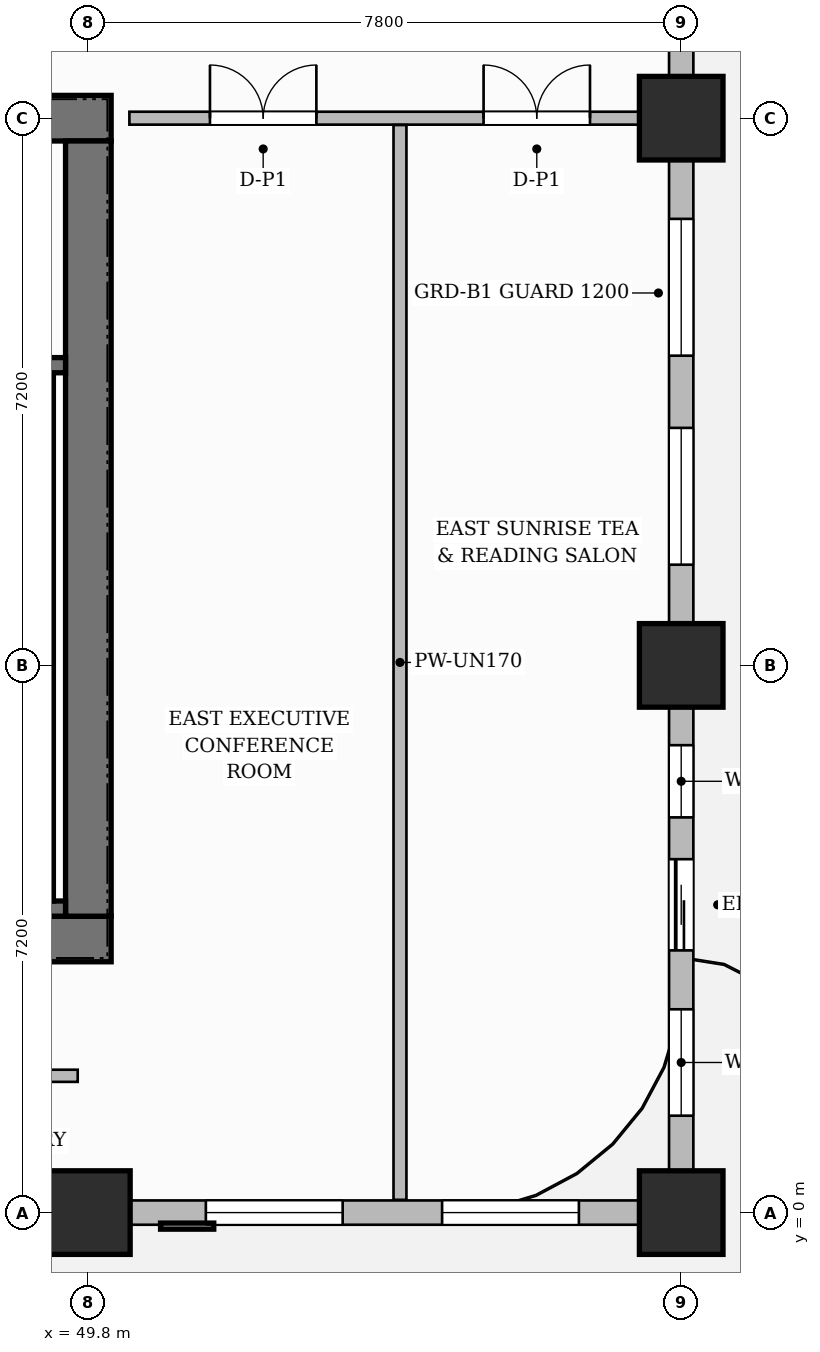
"""IFC4 building model, lengths in metres.
Left out: names, types, materials, properties, quantities, classifications, styles, units other than length and angle.
Written with IfcOpenShell. Run it as: python <this file> out.ifc"""

import sys

from ifc_helpers import new_model, si_unit, direction, frame, frame_2d, origin, origin_2d, place, context, subcontext, project, spatial, rectangle, extrude, source, transform, mapped, element, fill, save


model = new_model("IFC4")
c1 = context("Model", 3, precision=1e-05, world=origin(), true_north=direction((0.0, 1.0)))
c2 = subcontext(c1, "Body", "Model", "MODEL_VIEW")
j1 = project(units=[si_unit("LENGTHUNIT", "METRE"), si_unit("PLANEANGLEUNIT", "RADIAN")], contexts=[c1])
p1 = place(None, origin())
s1 = spatial("IfcSite", under=j1, at=p1, CompositionType="ELEMENT")
p2 = place(p1, origin())
s2 = spatial("IfcBuilding", under=s1, at=p2, CompositionType="ELEMENT")
p3 = place(p2, frame((0.0, 0.0, 39.8)))
s3 = spatial("IfcBuildingStorey", under=s2, at=p3, CompositionType="ELEMENT", Elevation=39.8)
p4 = place(p3, frame((34.5, 3.6, 0.0), z_axis=(0.0, 0.0, 1.0), x_axis=(1.0, 0.0, 0.0)))
e1 = element("IfcWall", 1, at=p4, inside=s3, PredefinedType="SHEAR", context=c2, shape_type="SweptSolid", body=[
    extrude(rectangle(XDim=15.6, YDim=0.6, at=frame_2d((7.8, 0.0))), origin(), (0.0, 0.0, 1.0), 3.7),
])
p5 = place(p4, frame((4.77, 0.0, 0.0)))
e2 = element("IfcOpeningElement", 2, at=p5, cuts=e1, PredefinedType="OPENING", context=c2, shape_type="SweptSolid", body=[
    extrude(rectangle(XDim=0.9, YDim=2.1, at=frame_2d((0.45, 1.05))), frame((0.0, 0.31, 0.0), z_axis=(0.0, -1.0, 0.0), x_axis=(1.0, 0.0, 0.0)), (0.0, 0.0, 1.0), 0.62),
])
p6 = place(p4, frame((7.15, 0.0, 0.0)))
e3 = element("IfcOpeningElement", 3, at=p6, cuts=e1, PredefinedType="OPENING", context=c2, shape_type="SweptSolid", body=[
    extrude(rectangle(XDim=0.9, YDim=2.1, at=frame_2d((0.45, 1.05))), frame((0.0, 0.31, 0.0), z_axis=(0.0, -1.0, 0.0), x_axis=(1.0, 0.0, 0.0)), (0.0, 0.0, 1.0), 0.62),
])
p7 = place(p3, frame((34.5, 14.4, 0.0), z_axis=(0.0, 0.0, 1.0), x_axis=(1.0, 0.0, 0.0)))
e4 = element("IfcWall", 4, at=p7, inside=s3, PredefinedType="SHEAR", context=c2, shape_type="SweptSolid", body=[
    extrude(rectangle(XDim=15.6, YDim=0.6, at=frame_2d((7.8, 0.0))), origin(), (0.0, 0.0, 1.0), 3.7),
])
p8 = place(p7, frame((5.43, 0.0, 0.0)))
e5 = element("IfcOpeningElement", 5, at=p8, cuts=e4, PredefinedType="OPENING", context=c2, shape_type="SweptSolid", body=[
    extrude(rectangle(XDim=1.5, YDim=2.2, at=frame_2d((0.75, 1.1))), frame((0.0, 0.31, 0.0), z_axis=(0.0, -1.0, 0.0), x_axis=(1.0, 0.0, 0.0)), (0.0, 0.0, 1.0), 0.62),
])
p9 = place(p7, frame((1.645, 0.0, 0.0)))
e6 = element("IfcOpeningElement", 6, at=p9, cuts=e4, PredefinedType="OPENING", context=c2, shape_type="SweptSolid", body=[
    extrude(rectangle(XDim=1.05, YDim=2.15, at=frame_2d((0.525, 1.075))), frame((0.0, 0.31, 0.0), z_axis=(0.0, -1.0, 0.0), x_axis=(1.0, 0.0, 0.0)), (0.0, 0.0, 1.0), 0.62),
])
p10 = place(p7, frame((11.275, 0.0, 0.0)))
e7 = element("IfcOpeningElement", 7, at=p10, cuts=e4, PredefinedType="OPENING", context=c2, shape_type="SweptSolid", body=[
    extrude(rectangle(XDim=1.05, YDim=2.15, at=frame_2d((0.525, 1.075))), frame((0.0, 0.31, 0.0), z_axis=(0.0, -1.0, 0.0), x_axis=(1.0, 0.0, 0.0)), (0.0, 0.0, 1.0), 0.62),
])
p11 = place(p3, frame((49.8, 3.9, 0.0), z_axis=(0.0, 0.0, 1.0), x_axis=(0.0, 1.0, 0.0)))
e8 = element("IfcWall", 8, at=p11, inside=s3, PredefinedType="SHEAR", context=c2, shape_type="SweptSolid", body=[
    extrude(rectangle(XDim=10.2, YDim=0.6, at=frame_2d((5.1, 0.0))), origin(), (0.0, 0.0, 1.0), 3.7),
])
m1 = source(origin(), c2, "Body", "SweptSolid", [
    extrude(rectangle(XDim=1.1, YDim=1.1, at=origin_2d()), origin(), (0.0, 0.0, 1.0), 3.7),
])
for number, where, z_axis, x_axis in (
    (9, (49.8, 0.0, 0.0), (0.0, 0.0, 1.0), (1.0, 0.0, 0.0)),
    (10, (57.6, 0.0, 0.0), (0.0, 0.0, 1.0), (1.0, 0.0, 0.0)),
    (11, (57.6, 7.2, 0.0), (0.0, 0.0, 1.0), (1.0, 0.0, 0.0)),
    (12, (57.6, 14.4, 0.0), (0.0, 0.0, 1.0), (1.0, 0.0, 0.0)),
):
    element("IfcColumn", number, at=place(p3, frame(where, z_axis=z_axis, x_axis=x_axis)), inside=s3, PredefinedType="COLUMN", context=c2, shape_type="MappedRepresentation", body=[
        mapped(m1, transform((0.0, 0.0, 0.0), scale=1.0)),
    ])
p12 = place(p3, frame((43.12, 4.0, 0.0), z_axis=(0.0, 0.0, 1.0), x_axis=(1.0, 0.0, 0.0)))
e13 = element("IfcWall", 13, at=p12, inside=s3, PredefinedType="SHEAR", context=c2, shape_type="SweptSolid", body=[
    extrude(rectangle(XDim=6.38, YDim=0.2, at=frame_2d((3.19, 0.0))), origin(), (0.0, 0.0, 1.0), 3.7),
])
p13 = place(p3, frame((49.24, 4.1, 0.0), z_axis=(0.0, 0.0, 1.0), x_axis=(0.0, 1.0, 0.0)))
e14 = element("IfcWall", 14, at=p13, inside=s3, PredefinedType="SHEAR", context=c2, shape_type="SweptSolid", body=[
    extrude(rectangle(XDim=6.95, YDim=0.2, at=frame_2d((3.475, 0.0))), origin(), (0.0, 0.0, 1.0), 3.7),
])
p14 = place(p3, frame((43.12, 11.15, 0.0), z_axis=(0.0, 0.0, 1.0), x_axis=(1.0, 0.0, 0.0)))
e15 = element("IfcWall", 15, at=p14, inside=s3, PredefinedType="SHEAR", context=c2, shape_type="SweptSolid", body=[
    extrude(rectangle(XDim=6.38, YDim=0.2, at=frame_2d((3.19, 0.0))), origin(), (0.0, 0.0, 1.0), 3.7),
])
p15 = place(p14, frame((1.045, 0.0, 0.0)))
e16 = element("IfcOpeningElement", 16, at=p15, cuts=e15, PredefinedType="OPENING", context=c2, shape_type="SweptSolid", body=[
    extrude(rectangle(XDim=1.05, YDim=2.2, at=frame_2d((0.525, 1.1))), frame((0.0, 0.11, 0.0), z_axis=(0.0, -1.0, 0.0), x_axis=(1.0, 0.0, 0.0)), (0.0, 0.0, 1.0), 0.22),
])
p16 = place(p14, frame((4.125, 0.0, 0.0)))
e17 = element("IfcOpeningElement", 17, at=p16, cuts=e15, PredefinedType="OPENING", context=c2, shape_type="SweptSolid", body=[
    extrude(rectangle(XDim=1.05, YDim=2.2, at=frame_2d((0.525, 1.1))), frame((0.0, 0.11, 0.0), z_axis=(0.0, -1.0, 0.0), x_axis=(1.0, 0.0, 0.0)), (0.0, 0.0, 1.0), 0.22),
])
p17 = place(p3, frame((30.29, 1.8, 0.0), z_axis=(0.0, 0.0, 1.0), x_axis=(1.0, 0.0, 0.0)))
e18 = element("IfcWall", 18, at=p17, inside=s3, PredefinedType="PARTITIONING", context=c2, shape_type="SweptSolid", body=[
    extrude(rectangle(XDim=19.37, YDim=0.16, at=frame_2d((9.685, 0.0))), origin(), (0.0, 0.0, 1.0), 3.45),
])
p18 = place(p17, frame((5.213, 0.0, 0.0)))
e19 = element("IfcOpeningElement", 19, at=p18, cuts=e18, PredefinedType="OPENING", context=c2, shape_type="SweptSolid", body=[
    extrude(rectangle(XDim=0.9, YDim=2.15, at=frame_2d((0.45, 1.075))), frame((0.0, 0.09, 0.0), z_axis=(0.0, -1.0, 0.0), x_axis=(1.0, 0.0, 0.0)), (0.0, 0.0, 1.0), 0.18),
])
p19 = place(p17, frame((14.06, 0.0, 0.0)))
e20 = element("IfcOpeningElement", 20, at=p19, cuts=e18, PredefinedType="OPENING", context=c2, shape_type="SweptSolid", body=[
    extrude(rectangle(XDim=0.9, YDim=2.15, at=frame_2d((0.45, 1.075))), frame((0.0, 0.09, 0.0), z_axis=(0.0, -1.0, 0.0), x_axis=(1.0, 0.0, 0.0)), (0.0, 0.0, 1.0), 0.18),
])
p20 = place(p3, frame((50.34, 14.4, 0.0), z_axis=(0.0, 0.0, 1.0), x_axis=(1.0, 0.0, 0.0)))
e21 = element("IfcWall", 21, at=p20, inside=s3, PredefinedType="PARTITIONING", context=c2, shape_type="SweptSolid", body=[
    extrude(rectangle(XDim=7.07, YDim=0.17, at=frame_2d((3.535, 0.0))), origin(), (0.0, 0.0, 1.0), 2.885),
])
p21 = place(p20, frame((1.06, 0.0, 0.0)))
e22 = element("IfcOpeningElement", 22, at=p21, cuts=e21, PredefinedType="OPENING", context=c2, shape_type="SweptSolid", body=[
    extrude(rectangle(XDim=1.4, YDim=2.35, at=frame_2d((0.7, 1.175))), frame((0.0, 0.095, 0.0), z_axis=(0.0, -1.0, 0.0), x_axis=(1.0, 0.0, 0.0)), (0.0, 0.0, 1.0), 0.19),
])
p22 = place(p20, frame((4.66, 0.0, 0.0)))
e23 = element("IfcOpeningElement", 23, at=p22, cuts=e21, PredefinedType="OPENING", context=c2, shape_type="SweptSolid", body=[
    extrude(rectangle(XDim=1.4, YDim=2.35, at=frame_2d((0.7, 1.175))), frame((0.0, 0.095, 0.0), z_axis=(0.0, -1.0, 0.0), x_axis=(1.0, 0.0, 0.0)), (0.0, 0.0, 1.0), 0.19),
])
p23 = place(p3, frame((53.9, 0.168, 0.0), z_axis=(0.0, 0.0, 1.0), x_axis=(0.0, 1.0, 0.0)))
e24 = element("IfcWall", 24, at=p23, inside=s3, PredefinedType="PARTITIONING", context=c2, shape_type="SweptSolid", body=[
    extrude(rectangle(XDim=14.142, YDim=0.17, at=frame_2d((7.071, 0.0))), origin(), (0.0, 0.0, 1.0), 3.035),
])
p24 = place(p3, frame((14.4, 0.0, 0.0), z_axis=(0.0, 0.0, 1.0), x_axis=(1.0, 0.0, 0.0)))
e25 = element("IfcWall", 25, at=p24, inside=s3, PredefinedType="SOLIDWALL", context=c2, shape_type="SweptSolid", body=[
    extrude(rectangle(XDim=43.2, YDim=0.32, at=frame_2d((21.6, 0.0))), origin(), (0.0, 0.0, 1.0), 2.885),
])
p25 = place(p24, frame((1.5, 0.0, 0.0)))
e26 = element("IfcOpeningElement", 26, at=p25, cuts=e25, PredefinedType="OPENING", context=c2, shape_type="SweptSolid", body=[
    extrude(rectangle(XDim=1.2, YDim=2.2, at=frame_2d((0.6, 1.1))), frame((0.0, 0.17, 0.0), z_axis=(0.0, -1.0, 0.0), x_axis=(1.0, 0.0, 0.0)), (0.0, 0.0, 1.0), 0.34),
])
p26 = place(p24, frame((3.8, 0.0, 0.8)))
e27 = element("IfcOpeningElement", 27, at=p26, cuts=e25, PredefinedType="OPENING", context=c2, shape_type="SweptSolid", body=[
    extrude(rectangle(XDim=1.8, YDim=1.85, at=frame_2d((0.9, 0.925))), frame((0.0, 0.17, 0.0), z_axis=(0.0, -1.0, 0.0), x_axis=(1.0, 0.0, 0.0)), (0.0, 0.0, 1.0), 0.34),
])
p27 = place(p24, frame((8.181, 0.0, 0.8)))
e28 = element("IfcOpeningElement", 28, at=p27, cuts=e25, PredefinedType="OPENING", context=c2, shape_type="SweptSolid", body=[
    extrude(rectangle(XDim=0.95, YDim=1.75, at=frame_2d((0.475, 0.875))), frame((0.0, 0.17, 0.0), z_axis=(0.0, -1.0, 0.0), x_axis=(1.0, 0.0, 0.0)), (0.0, 0.0, 1.0), 0.34),
])
p28 = place(p24, frame((10.564, 0.0, 0.8)))
e29 = element("IfcOpeningElement", 29, at=p28, cuts=e25, PredefinedType="OPENING", context=c2, shape_type="SweptSolid", body=[
    extrude(rectangle(XDim=1.8, YDim=1.85, at=frame_2d((0.9, 0.925))), frame((0.0, 0.17, 0.0), z_axis=(0.0, -1.0, 0.0), x_axis=(1.0, 0.0, 0.0)), (0.0, 0.0, 1.0), 0.34),
])
p29 = place(p24, frame((16.804, 0.0, 0.8)))
e30 = element("IfcOpeningElement", 30, at=p29, cuts=e25, PredefinedType="OPENING", context=c2, shape_type="SweptSolid", body=[
    extrude(rectangle(XDim=1.8, YDim=1.85, at=frame_2d((0.9, 0.925))), frame((0.0, 0.17, 0.0), z_axis=(0.0, -1.0, 0.0), x_axis=(1.0, 0.0, 0.0)), (0.0, 0.0, 1.0), 0.34),
])
p30 = place(p24, frame((22.396, 0.0, 0.8)))
e31 = element("IfcOpeningElement", 31, at=p30, cuts=e25, PredefinedType="OPENING", context=c2, shape_type="SweptSolid", body=[
    extrude(rectangle(XDim=1.8, YDim=1.85, at=frame_2d((0.9, 0.925))), frame((0.0, 0.17, 0.0), z_axis=(0.0, -1.0, 0.0), x_axis=(1.0, 0.0, 0.0)), (0.0, 0.0, 1.0), 0.34),
])
p31 = place(p24, frame((25.629, 0.0, 0.8)))
e32 = element("IfcOpeningElement", 32, at=p31, cuts=e25, PredefinedType="OPENING", context=c2, shape_type="SweptSolid", body=[
    extrude(rectangle(XDim=0.95, YDim=1.75, at=frame_2d((0.475, 0.875))), frame((0.0, 0.17, 0.0), z_axis=(0.0, -1.0, 0.0), x_axis=(1.0, 0.0, 0.0)), (0.0, 0.0, 1.0), 0.34),
])
p32 = place(p24, frame((29.075, 0.0, 0.8)))
e33 = element("IfcOpeningElement", 33, at=p32, cuts=e25, PredefinedType="OPENING", context=c2, shape_type="SweptSolid", body=[
    extrude(rectangle(XDim=1.8, YDim=1.85, at=frame_2d((0.9, 0.925))), frame((0.0, 0.17, 0.0), z_axis=(0.0, -1.0, 0.0), x_axis=(1.0, 0.0, 0.0)), (0.0, 0.0, 1.0), 0.34),
])
p33 = place(p24, frame((32.125, 0.0, 0.8)))
e34 = element("IfcOpeningElement", 34, at=p33, cuts=e25, PredefinedType="OPENING", context=c2, shape_type="SweptSolid", body=[
    extrude(rectangle(XDim=1.8, YDim=1.85, at=frame_2d((0.9, 0.925))), frame((0.0, 0.17, 0.0), z_axis=(0.0, -1.0, 0.0), x_axis=(1.0, 0.0, 0.0)), (0.0, 0.0, 1.0), 0.34),
])
p34 = place(p24, frame((36.946, 0.0, 0.8)))
e35 = element("IfcOpeningElement", 35, at=p34, cuts=e25, PredefinedType="OPENING", context=c2, shape_type="SweptSolid", body=[
    extrude(rectangle(XDim=1.8, YDim=1.85, at=frame_2d((0.9, 0.925))), frame((0.0, 0.17, 0.0), z_axis=(0.0, -1.0, 0.0), x_axis=(1.0, 0.0, 0.0)), (0.0, 0.0, 1.0), 0.34),
])
p35 = place(p24, frame((40.054, 0.0, 0.8)))
e36 = element("IfcOpeningElement", 36, at=p35, cuts=e25, PredefinedType="OPENING", context=c2, shape_type="SweptSolid", body=[
    extrude(rectangle(XDim=1.8, YDim=1.85, at=frame_2d((0.9, 0.925))), frame((0.0, 0.17, 0.0), z_axis=(0.0, -1.0, 0.0), x_axis=(1.0, 0.0, 0.0)), (0.0, 0.0, 1.0), 0.34),
])
p36 = place(p3, frame((57.6, 0.05, 0.0), z_axis=(0.0, 0.0, 1.0), x_axis=(0.0, 1.0, 0.0)))
e37 = element("IfcWall", 37, at=p36, inside=s3, PredefinedType="SOLIDWALL", context=c2, shape_type="SweptSolid", body=[
    extrude(rectangle(XDim=21.5, YDim=0.32, at=frame_2d((10.75, 0.0))), origin(), (0.0, 0.0, 1.0), 2.885),
])
p37 = place(p36, frame((3.4, 0.0, 0.0)))
e38 = element("IfcOpeningElement", 38, at=p37, cuts=e37, PredefinedType="OPENING", context=c2, shape_type="SweptSolid", body=[
    extrude(rectangle(XDim=1.2, YDim=2.2, at=frame_2d((0.6, 1.1))), frame((0.0, 0.17, 0.0), z_axis=(0.0, -1.0, 0.0), x_axis=(1.0, 0.0, 0.0)), (0.0, 0.0, 1.0), 0.34),
])
p38 = place(p36, frame((1.225, 0.0, 0.8)))
e39 = element("IfcOpeningElement", 39, at=p38, cuts=e37, PredefinedType="OPENING", context=c2, shape_type="SweptSolid", body=[
    extrude(rectangle(XDim=1.4, YDim=1.85, at=frame_2d((0.7, 0.925))), frame((0.0, 0.17, 0.0), z_axis=(0.0, -1.0, 0.0), x_axis=(1.0, 0.0, 0.0)), (0.0, 0.0, 1.0), 0.34),
])
p39 = place(p36, frame((5.15, 0.0, 0.8)))
e40 = element("IfcOpeningElement", 40, at=p39, cuts=e37, PredefinedType="OPENING", context=c2, shape_type="SweptSolid", body=[
    extrude(rectangle(XDim=0.95, YDim=1.75, at=frame_2d((0.475, 0.875))), frame((0.0, 0.17, 0.0), z_axis=(0.0, -1.0, 0.0), x_axis=(1.0, 0.0, 0.0)), (0.0, 0.0, 1.0), 0.34),
])
p40 = place(p36, frame((8.475, 0.0, 0.8)))
e41 = element("IfcOpeningElement", 41, at=p40, cuts=e37, PredefinedType="OPENING", context=c2, shape_type="SweptSolid", body=[
    extrude(rectangle(XDim=1.8, YDim=1.85, at=frame_2d((0.9, 0.925))), frame((0.0, 0.17, 0.0), z_axis=(0.0, -1.0, 0.0), x_axis=(1.0, 0.0, 0.0)), (0.0, 0.0, 1.0), 0.34),
])
p41 = place(p36, frame((11.225, 0.0, 0.8)))
e42 = element("IfcOpeningElement", 42, at=p41, cuts=e37, PredefinedType="OPENING", context=c2, shape_type="SweptSolid", body=[
    extrude(rectangle(XDim=1.8, YDim=1.85, at=frame_2d((0.9, 0.925))), frame((0.0, 0.17, 0.0), z_axis=(0.0, -1.0, 0.0), x_axis=(1.0, 0.0, 0.0)), (0.0, 0.0, 1.0), 0.34),
])
p42 = place(p36, frame((15.471, 0.0, 0.8)))
e43 = element("IfcOpeningElement", 43, at=p42, cuts=e37, PredefinedType="OPENING", context=c2, shape_type="SweptSolid", body=[
    extrude(rectangle(XDim=1.15, YDim=1.8, at=frame_2d((0.575, 0.9))), frame((0.0, 0.17, 0.0), z_axis=(0.0, -1.0, 0.0), x_axis=(1.0, 0.0, 0.0)), (0.0, 0.0, 1.0), 0.34),
])
p43 = place(p36, frame((17.954, 0.0, 0.8)))
e44 = element("IfcOpeningElement", 44, at=p43, cuts=e37, PredefinedType="OPENING", context=c2, shape_type="SweptSolid", body=[
    extrude(rectangle(XDim=1.8, YDim=1.85, at=frame_2d((0.9, 0.925))), frame((0.0, 0.17, 0.0), z_axis=(0.0, -1.0, 0.0), x_axis=(1.0, 0.0, 0.0)), (0.0, 0.0, 1.0), 0.34),
])
m2 = source(origin(), c2, "Body", "SweptSolid", [
    extrude(rectangle(XDim=1.4, YDim=2.35, at=frame_2d((0.7, 1.175))), frame((0.0, 0.025, 0.0), z_axis=(0.0, -1.0, 0.0), x_axis=(1.0, 0.0, 0.0)), (0.0, 0.0, 1.0), 0.05),
])
p44 = place(p21, origin())
e45 = element("IfcDoor", 45, at=p44, inside=s3, OperationType="DOUBLE_DOOR_SINGLE_SWING", PredefinedType="DOOR", context=c2, shape_type="MappedRepresentation", body=[
    mapped(m2, transform((0.0, 0.0, 0.0), scale=1.0)),
])
fill(e22, e45)
p45 = place(p22, origin())
e46 = element("IfcDoor", 46, at=p45, inside=s3, OperationType="DOUBLE_DOOR_SINGLE_SWING", PredefinedType="DOOR", context=c2, shape_type="MappedRepresentation", body=[
    mapped(m2, transform((0.0, 0.0, 0.0), scale=1.0)),
])
fill(e23, e46)
m3 = source(origin(), c2, "Body", "SweptSolid", [
    extrude(rectangle(XDim=1.2, YDim=2.2, at=frame_2d((0.6, 1.1))), frame((0.0, 0.025, 0.0), z_axis=(0.0, -1.0, 0.0), x_axis=(1.0, 0.0, 0.0)), (0.0, 0.0, 1.0), 0.05),
])
p46 = place(p37, origin())
e47 = element("IfcDoor", 47, at=p46, inside=s3, OperationType="SLIDING_TO_LEFT", PredefinedType="DOOR", context=c2, shape_type="MappedRepresentation", body=[
    mapped(m3, transform((0.0, 0.0, 0.0), scale=1.0)),
])
fill(e38, e47)
m4 = source(origin(), c2, "Body", "SweptSolid", [
    extrude(rectangle(XDim=1.8, YDim=1.85, at=frame_2d((0.9, 0.925))), frame((0.0, 0.03, 0.0), z_axis=(0.0, -1.0, 0.0), x_axis=(1.0, 0.0, 0.0)), (0.0, 0.0, 1.0), 0.06),
])
p47 = place(p34, origin())
e48 = element("IfcWindow", 48, at=p47, inside=s3, PartitioningType="DOUBLE_PANEL_VERTICAL", PredefinedType="WINDOW", context=c2, shape_type="MappedRepresentation", body=[
    mapped(m4, transform((0.0, 0.0, 0.0), scale=1.0)),
])
fill(e35, e48)
p48 = place(p35, origin())
e49 = element("IfcWindow", 49, at=p48, inside=s3, PartitioningType="DOUBLE_PANEL_VERTICAL", PredefinedType="WINDOW", context=c2, shape_type="MappedRepresentation", body=[
    mapped(m4, transform((0.0, 0.0, 0.0), scale=1.0)),
])
fill(e36, e49)
m5 = source(origin(), c2, "Body", "SweptSolid", [
    extrude(rectangle(XDim=1.4, YDim=1.85, at=frame_2d((0.7, 0.925))), frame((0.0, 0.03, 0.0), z_axis=(0.0, -1.0, 0.0), x_axis=(1.0, 0.0, 0.0)), (0.0, 0.0, 1.0), 0.06),
])
p49 = place(p38, origin())
e50 = element("IfcWindow", 50, at=p49, inside=s3, PartitioningType="SINGLE_PANEL", PredefinedType="WINDOW", context=c2, shape_type="MappedRepresentation", body=[
    mapped(m5, transform((0.0, 0.0, 0.0), scale=1.0)),
])
fill(e39, e50)
m6 = source(origin(), c2, "Body", "SweptSolid", [
    extrude(rectangle(XDim=0.95, YDim=1.75, at=frame_2d((0.475, 0.875))), frame((0.0, 0.03, 0.0), z_axis=(0.0, -1.0, 0.0), x_axis=(1.0, 0.0, 0.0)), (0.0, 0.0, 1.0), 0.06),
])
p50 = place(p39, origin())
e51 = element("IfcWindow", 51, at=p50, inside=s3, PartitioningType="SINGLE_PANEL", PredefinedType="WINDOW", context=c2, shape_type="MappedRepresentation", body=[
    mapped(m6, transform((0.0, 0.0, 0.0), scale=1.0)),
])
fill(e40, e51)
p51 = place(p40, origin())
e52 = element("IfcWindow", 52, at=p51, inside=s3, PartitioningType="DOUBLE_PANEL_VERTICAL", PredefinedType="WINDOW", context=c2, shape_type="MappedRepresentation", body=[
    mapped(m4, transform((0.0, 0.0, 0.0), scale=1.0)),
])
fill(e41, e52)
p52 = place(p41, origin())
e53 = element("IfcWindow", 53, at=p52, inside=s3, PartitioningType="DOUBLE_PANEL_VERTICAL", PredefinedType="WINDOW", context=c2, shape_type="MappedRepresentation", body=[
    mapped(m4, transform((0.0, 0.0, 0.0), scale=1.0)),
])
fill(e42, e53)
save(model, sys.argv[1])
